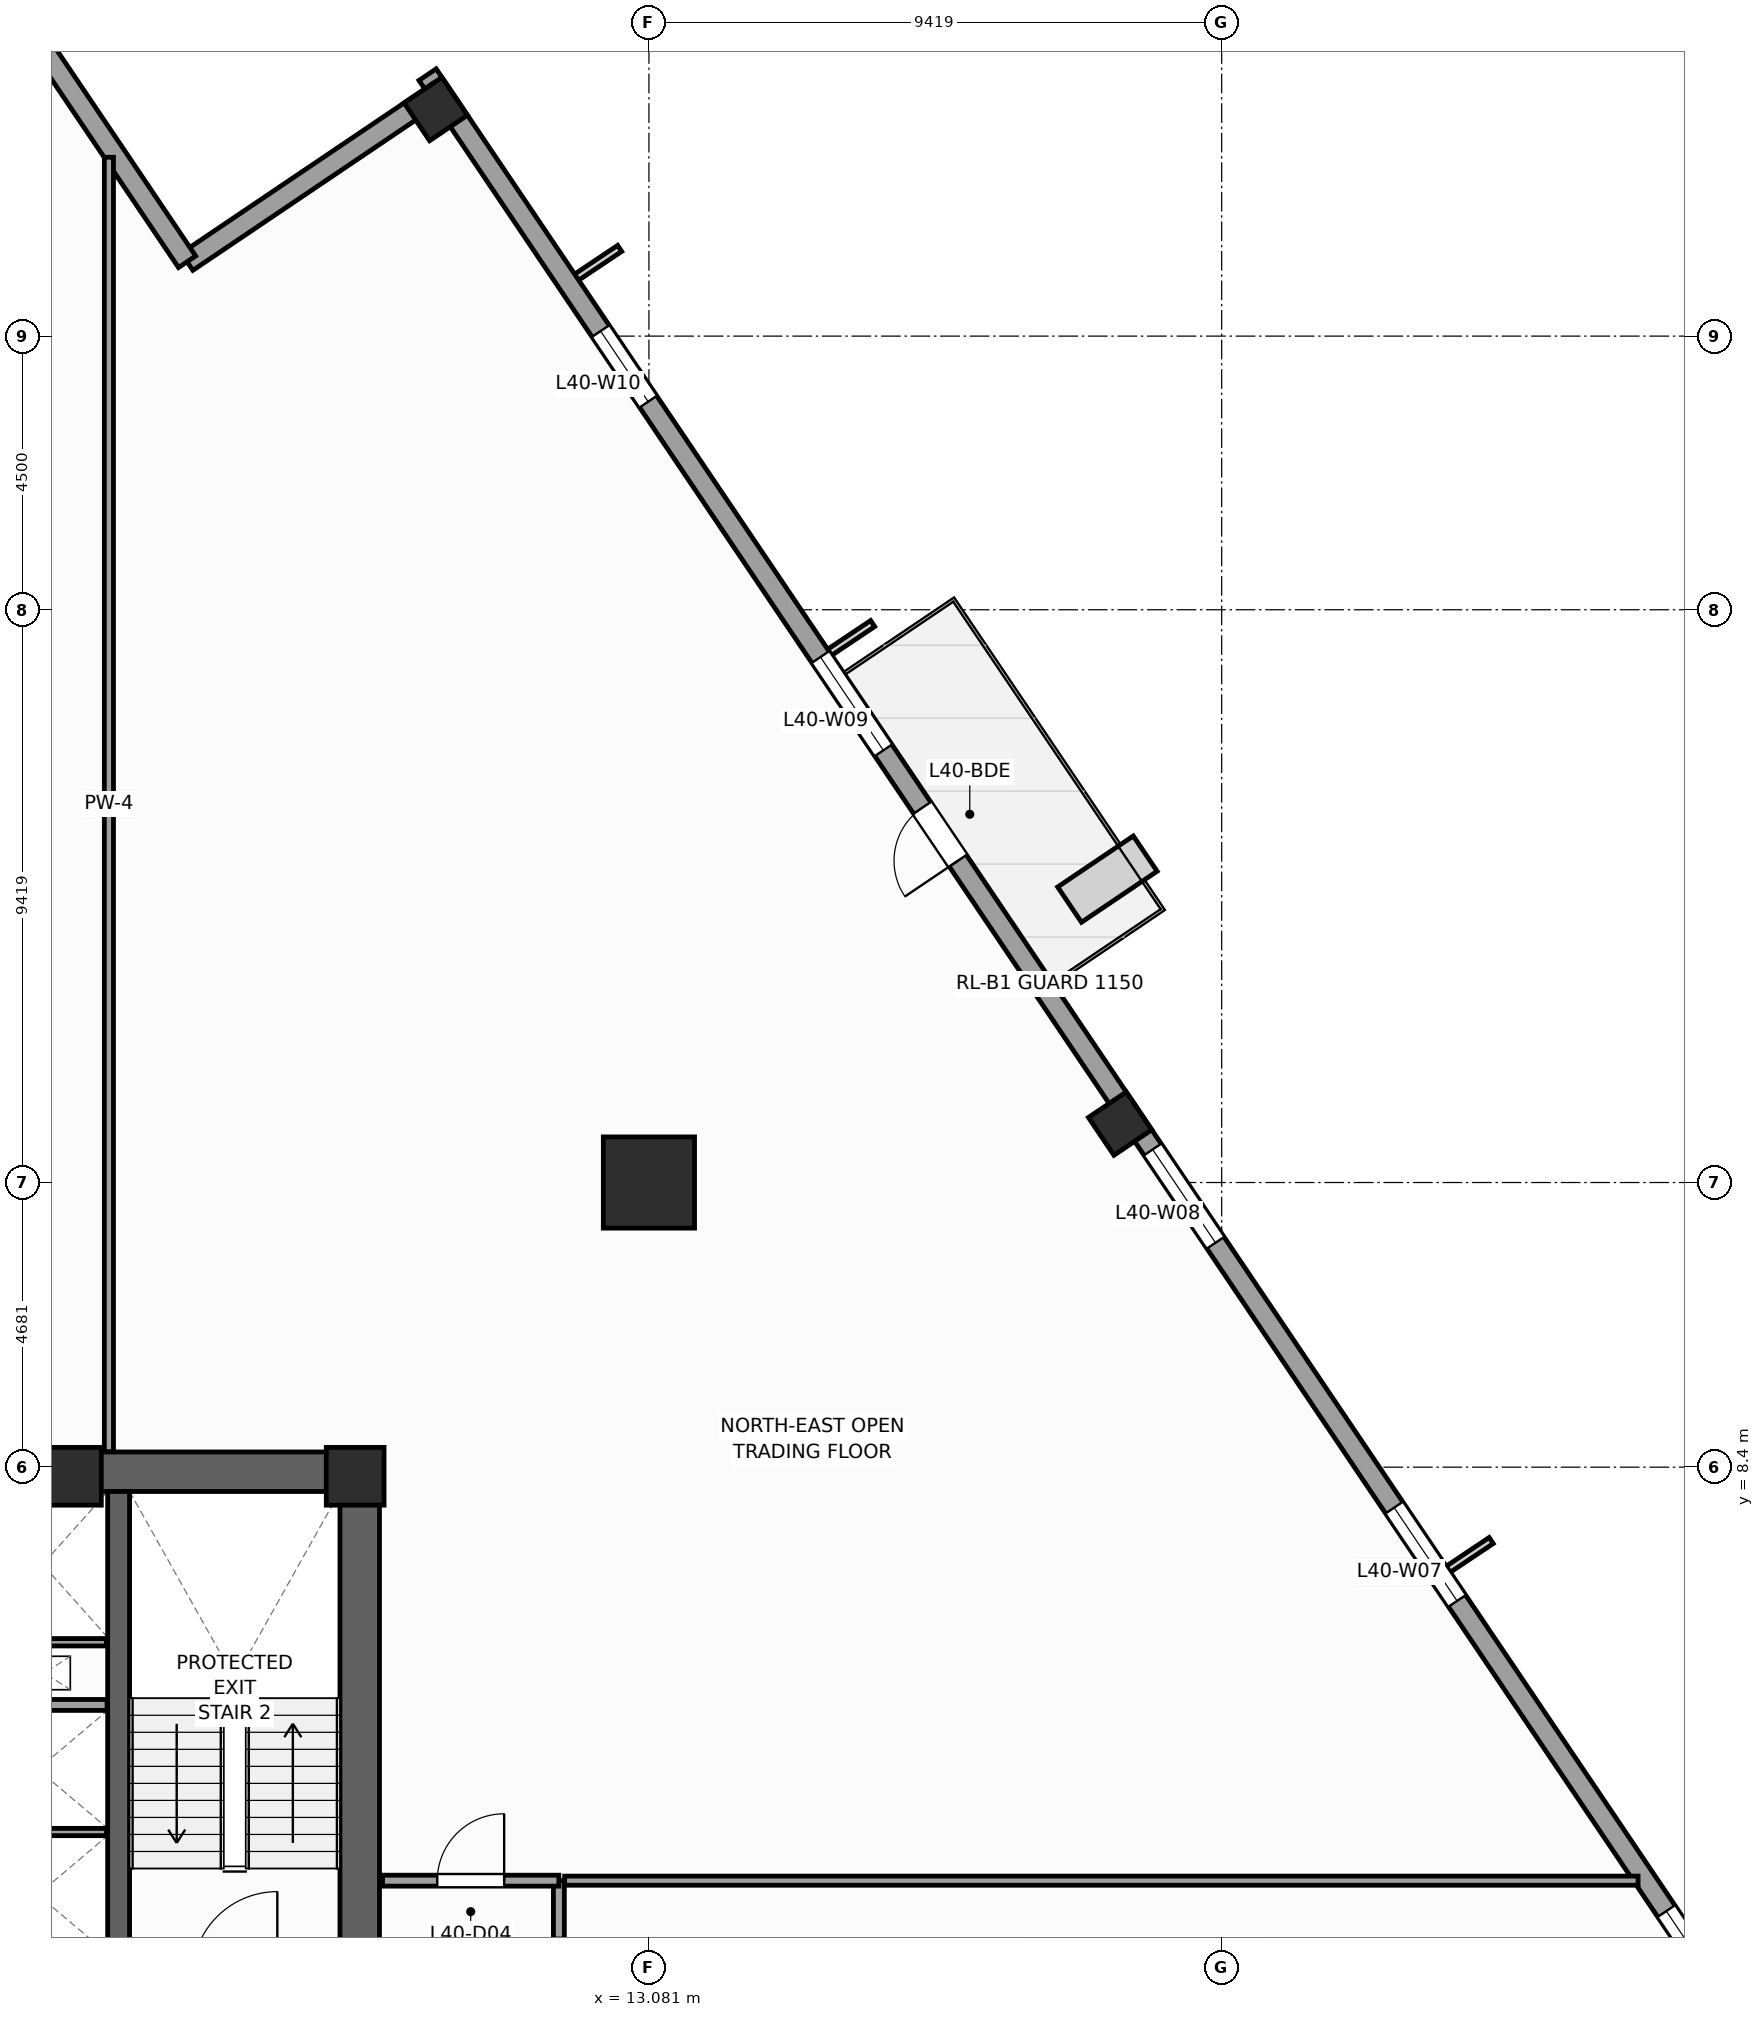
"""IFC4 building model, lengths in metres.
Left out: names, types, materials, properties, quantities, classifications, styles, units other than length and angle.
Written with IfcOpenShell. Run it as: python <this file> out.ifc"""

import sys

from ifc_helpers import new_model, si_unit, direction, frame, frame_2d, origin, origin_2d, place, context, subcontext, project, spatial, rectangle, extrude, source, transform, mapped, element, fill, save


model = new_model("IFC4")
c1 = context("Model", 3, precision=1e-05, world=origin(), true_north=direction((0.0, 1.0)))
c2 = subcontext(c1, "Body", "Model", "MODEL_VIEW")
j1 = project(units=[si_unit("LENGTHUNIT", "METRE"), si_unit("PLANEANGLEUNIT", "RADIAN")], contexts=[c1])
p1 = place(None, origin())
s1 = spatial("IfcSite", under=j1, at=p1, CompositionType="ELEMENT")
p2 = place(p1, origin())
s2 = spatial("IfcBuilding", under=s1, at=p2, CompositionType="ELEMENT")
p3 = place(p2, frame((0.0, 0.0, 168.4)))
s3 = spatial("IfcBuildingStorey", under=s2, at=p3, CompositionType="ELEMENT", Elevation=168.4)
p4 = place(p3, frame((-8.65, 8.325, 0.0), z_axis=(0.0, 0.0, 1.0), x_axis=(1.0, 0.0, 0.0)))
e1 = element("IfcWall", 1, at=p4, inside=s3, PredefinedType="SHEAR", context=c2, shape_type="SweptSolid", body=[
    extrude(rectangle(XDim=17.3, YDim=0.65, at=frame_2d((8.65, 0.0))), origin(), (0.0, 0.0, 1.0), 4.0),
])
p5 = place(p3, frame((8.325, -8.0, 0.0), z_axis=(0.0, 0.0, 1.0), x_axis=(0.0, 1.0, 0.0)))
e2 = element("IfcWall", 2, at=p5, inside=s3, PredefinedType="SHEAR", context=c2, shape_type="SweptSolid", body=[
    extrude(rectangle(XDim=16.0, YDim=0.65, at=frame_2d((8.0, 0.0))), origin(), (0.0, 0.0, 1.0), 4.0),
])
p6 = place(p5, frame((4.69, 0.0, 0.0)))
e3 = element("IfcOpeningElement", 3, at=p6, cuts=e2, PredefinedType="OPENING", context=c2, shape_type="SweptSolid", body=[
    extrude(rectangle(XDim=1.3, YDim=2.2, at=frame_2d((0.65, 1.1))), frame((0.0, 0.335, 0.0), z_axis=(0.0, -1.0, 0.0), x_axis=(1.0, 0.0, 0.0)), (0.0, 0.0, 1.0), 0.67),
])
p7 = place(p3, frame((4.36, -8.0, 0.0), z_axis=(0.0, 0.0, 1.0), x_axis=(0.0, 1.0, 0.0)))
e4 = element("IfcWall", 4, at=p7, inside=s3, PredefinedType="SHEAR", context=c2, shape_type="SweptSolid", body=[
    extrude(rectangle(XDim=16.0, YDim=0.36, at=frame_2d((8.0, 0.0))), origin(), (0.0, 0.0, 1.0), 4.0),
])
m1 = source(origin(), c2, "Body", "SweptSolid", [
    extrude(rectangle(XDim=0.95, YDim=0.95, at=origin_2d()), origin(), (0.0, 0.0, 1.0), 4.0),
])
for number, where, z_axis, x_axis in (
    (5, (8.25, 8.25, 0.0), (0.0, 0.0, 1.0), (1.0, 0.0, 0.0)),
    (6, (3.6, 8.25, 0.0), (0.0, 0.0, 1.0), (1.0, 0.0, 0.0)),
):
    element("IfcColumn", number, at=place(p3, frame(where, z_axis=z_axis, x_axis=x_axis)), inside=s3, PredefinedType="PILASTER", context=c2, shape_type="MappedRepresentation", body=[
        mapped(m1, transform((0.0, 0.0, 0.0), scale=1.0)),
    ])
m2 = source(origin(), c2, "Body", "SweptSolid", [
    extrude(rectangle(XDim=1.5, YDim=1.5, at=origin_2d()), origin(), (0.0, 0.0, 1.0), 4.0),
])
p8 = place(p3, frame((13.081, 13.081, 0.0), z_axis=(0.0, 0.0, 1.0), x_axis=(1.0, 0.0, 0.0)))
e7 = element("IfcColumn", 7, at=p8, inside=s3, PredefinedType="COLUMN", context=c2, shape_type="MappedRepresentation", body=[
    mapped(m2, transform((0.0, 0.0, 0.0), scale=1.0)),
])
m3 = source(origin(), c2, "Body", "SweptSolid", [
    extrude(rectangle(XDim=0.75, YDim=0.75, at=origin_2d()), origin(), (0.0, 0.0, 1.0), 4.0),
])
for number, where, z_axis, x_axis in (
    (8, (20.83, 14.05, 0.0), (0.0, 0.0, 1.0), (0.829, 0.559, 0.0)),
    (9, (9.576, 30.734, 0.0), (0.0, 0.0, 1.0), (0.829, 0.559, 0.0)),
):
    element("IfcColumn", number, at=place(p3, frame(where, z_axis=z_axis, x_axis=x_axis)), inside=s3, PredefinedType="COLUMN", context=c2, shape_type="MappedRepresentation", body=[
        mapped(m3, transform((0.0, 0.0, 0.0), scale=1.0)),
    ])
p9 = place(p3, frame((32.558, -2.972, 0.0), z_axis=(0.0, 0.0, 1.0), x_axis=(-0.559194910251, 0.829036218961, 0.0)))
e10 = element("IfcWall", 10, at=p9, inside=s3, PredefinedType="STANDARD", context=c2, shape_type="SweptSolid", body=[
    extrude(rectangle(XDim=41.34, YDim=0.34, at=frame_2d((20.67, 0.0))), origin(), (0.0, 0.0, 1.0), 3.04),
])
p10 = place(p9, frame((25.745, 0.0, 0.0)))
e11 = element("IfcOpeningElement", 11, at=p10, cuts=e10, PredefinedType="OPENING", context=c2, shape_type="SweptSolid", body=[
    extrude(rectangle(XDim=1.05, YDim=2.25, at=frame_2d((0.525, 1.125))), frame((0.0, 0.18, 0.0), z_axis=(0.0, -1.0, 0.0), x_axis=(1.0, 0.0, 0.0)), (0.0, 0.0, 1.0), 0.36),
])
p11 = place(p9, frame((3.511, 0.0, 0.56)))
e12 = element("IfcOpeningElement", 12, at=p11, cuts=e10, PredefinedType="OPENING", context=c2, shape_type="SweptSolid", body=[
    extrude(rectangle(XDim=1.4, YDim=2.4, at=frame_2d((0.7, 1.2))), frame((0.0, 0.18, 0.0), z_axis=(0.0, -1.0, 0.0), x_axis=(1.0, 0.0, 0.0)), (0.0, 0.0, 1.0), 0.36),
])
p12 = place(p9, frame((11.064, 0.0, 0.61)))
e13 = element("IfcOpeningElement", 13, at=p12, cuts=e10, PredefinedType="OPENING", context=c2, shape_type="SweptSolid", body=[
    extrude(rectangle(XDim=1.85, YDim=2.35, at=frame_2d((0.925, 1.175))), frame((0.0, 0.18, 0.0), z_axis=(0.0, -1.0, 0.0), x_axis=(1.0, 0.0, 0.0)), (0.0, 0.0, 1.0), 0.36),
])
p13 = place(p9, frame((18.168, 0.0, 0.61)))
e14 = element("IfcOpeningElement", 14, at=p13, cuts=e10, PredefinedType="OPENING", context=c2, shape_type="SweptSolid", body=[
    extrude(rectangle(XDim=1.85, YDim=2.35, at=frame_2d((0.925, 1.175))), frame((0.0, 0.18, 0.0), z_axis=(0.0, -1.0, 0.0), x_axis=(1.0, 0.0, 0.0)), (0.0, 0.0, 1.0), 0.36),
])
p14 = place(p9, frame((27.936, 0.0, 0.61)))
e15 = element("IfcOpeningElement", 15, at=p14, cuts=e10, PredefinedType="OPENING", context=c2, shape_type="SweptSolid", body=[
    extrude(rectangle(XDim=1.85, YDim=2.35, at=frame_2d((0.925, 1.175))), frame((0.0, 0.18, 0.0), z_axis=(0.0, -1.0, 0.0), x_axis=(1.0, 0.0, 0.0)), (0.0, 0.0, 1.0), 0.36),
])
p15 = place(p9, frame((34.852, 0.0, 0.56)))
e16 = element("IfcOpeningElement", 16, at=p15, cuts=e10, PredefinedType="OPENING", context=c2, shape_type="SweptSolid", body=[
    extrude(rectangle(XDim=1.4, YDim=2.4, at=frame_2d((0.7, 1.2))), frame((0.0, 0.18, 0.0), z_axis=(0.0, -1.0, 0.0), x_axis=(1.0, 0.0, 0.0)), (0.0, 0.0, 1.0), 0.36),
])
p16 = place(p3, frame((9.631, 31.019, 0.0), z_axis=(0.0, 0.0, 1.0), x_axis=(-0.829025804298, -0.559210350234, 0.0)))
e17 = element("IfcWall", 17, at=p16, inside=s3, PredefinedType="STANDARD", context=c2, shape_type="SweptSolid", body=[
    extrude(rectangle(XDim=5.0, YDim=0.34, at=frame_2d((2.5, 0.0))), origin(), (0.0, 0.0, 1.0), 3.74),
])
p17 = place(p3, frame((5.486, 28.223, 0.0), z_axis=(0.0, 0.0, 1.0), x_axis=(-0.559171107879, 0.82905227345, 0.0)))
e18 = element("IfcWall", 18, at=p17, inside=s3, PredefinedType="STANDARD", context=c2, shape_type="SweptSolid", body=[
    extrude(rectangle(XDim=5.17, YDim=0.34, at=frame_2d((2.585, 0.0))), origin(), (0.0, 0.0, 1.0), 3.04),
])
p18 = place(p3, frame((1.89, 4.49, 0.0), z_axis=(0.0, 0.0, 1.0), x_axis=(1.0, 0.0, 0.0)))
e19 = element("IfcWall", 19, at=p18, inside=s3, PredefinedType="PARTITIONING", context=c2, shape_type="SweptSolid", body=[
    extrude(rectangle(XDim=2.28, YDim=0.18, at=frame_2d((1.14, 0.0))), origin(), (0.0, 0.0, 1.0), 3.74),
])
p19 = place(p3, frame((1.9, 2.4, 0.0), z_axis=(0.0, 0.0, 1.0), x_axis=(1.0, 0.0, 0.0)))
e20 = element("IfcWall", 20, at=p19, inside=s3, PredefinedType="PARTITIONING", context=c2, shape_type="SweptSolid", body=[
    extrude(rectangle(XDim=2.26, YDim=0.12, at=frame_2d((1.13, 0.0))), origin(), (0.0, 0.0, 1.0), 3.74),
])
p20 = place(p3, frame((2.06, 5.52, 0.0), z_axis=(0.0, 0.0, 1.0), x_axis=(1.0, 0.0, 0.0)))
e21 = element("IfcWall", 21, at=p20, inside=s3, PredefinedType="PARTITIONING", context=c2, shape_type="SweptSolid", body=[
    extrude(rectangle(XDim=2.1, YDim=0.12, at=frame_2d((1.05, 0.0))), origin(), (0.0, 0.0, 1.0), 3.74),
])
p21 = place(p3, frame((11.6, -10.35, 0.0), z_axis=(0.0, 0.0, 1.0), x_axis=(0.0, 1.0, 0.0)))
e22 = element("IfcWall", 22, at=p21, inside=s3, PredefinedType="PARTITIONING", context=c2, shape_type="SweptSolid", body=[
    extrude(rectangle(XDim=11.95, YDim=0.18, at=frame_2d((5.975, 0.0))), origin(), (0.0, 0.0, 1.0), 3.74),
])
p22 = place(p21, frame((9.911, 0.0, 0.0)))
e23 = element("IfcOpeningElement", 23, at=p22, cuts=e22, PredefinedType="OPENING", context=c2, shape_type="SweptSolid", body=[
    extrude(rectangle(XDim=1.1, YDim=2.2, at=frame_2d((0.55, 1.1))), frame((0.0, 0.1, 0.0), z_axis=(0.0, -1.0, 0.0), x_axis=(1.0, 0.0, 0.0)), (0.0, 0.0, 1.0), 0.2),
])
p23 = place(p21, frame((4.1, 0.0, 0.0)))
e24 = element("IfcOpeningElement", 24, at=p23, cuts=e22, PredefinedType="OPENING", context=c2, shape_type="SweptSolid", body=[
    extrude(rectangle(XDim=1.1, YDim=2.2, at=frame_2d((0.55, 1.1))), frame((0.0, 0.1, 0.0), z_axis=(0.0, -1.0, 0.0), x_axis=(1.0, 0.0, 0.0)), (0.0, 0.0, 1.0), 0.2),
])
p24 = place(p21, frame((7.675, 0.0, 0.0)))
e25 = element("IfcOpeningElement", 25, at=p24, cuts=e22, PredefinedType="OPENING", context=c2, shape_type="SweptSolid", body=[
    extrude(rectangle(XDim=1.1, YDim=2.2, at=frame_2d((0.55, 1.1))), frame((0.0, 0.1, 0.0), z_axis=(0.0, -1.0, 0.0), x_axis=(1.0, 0.0, 0.0)), (0.0, 0.0, 1.0), 0.2),
])
p25 = place(p3, frame((8.7, 1.6, 0.0), z_axis=(0.0, 0.0, 1.0), x_axis=(1.0, 0.0, 0.0)))
e26 = element("IfcWall", 26, at=p25, inside=s3, PredefinedType="PARTITIONING", context=c2, shape_type="SweptSolid", body=[
    extrude(rectangle(XDim=2.9, YDim=0.18, at=frame_2d((1.45, 0.0))), origin(), (0.0, 0.0, 1.0), 3.74),
])
p26 = place(p25, frame((0.9, 0.0, 0.0)))
e27 = element("IfcOpeningElement", 27, at=p26, cuts=e26, PredefinedType="OPENING", context=c2, shape_type="SweptSolid", body=[
    extrude(rectangle(XDim=1.1, YDim=2.2, at=frame_2d((0.55, 1.1))), frame((0.0, 0.1, 0.0), z_axis=(0.0, -1.0, 0.0), x_axis=(1.0, 0.0, 0.0)), (0.0, 0.0, 1.0), 0.2),
])
p27 = place(p3, frame((4.2, 8.655, 0.0), z_axis=(0.0, 0.0, 1.0), x_axis=(0.0, 1.0, 0.0)))
e28 = element("IfcWall", 28, at=p27, inside=s3, PredefinedType="PARTITIONING", context=c2, shape_type="SweptSolid", body=[
    extrude(rectangle(XDim=21.286, YDim=0.15, at=frame_2d((10.643, 0.0))), origin(), (0.0, 0.0, 1.0), 3.74),
])
p28 = place(p3, frame((11.695, 1.6, 0.0), z_axis=(0.0, 0.0, 1.0), x_axis=(1.0, 0.0, 0.0)))
e29 = element("IfcWall", 29, at=p28, inside=s3, PredefinedType="PARTITIONING", context=c2, shape_type="SweptSolid", body=[
    extrude(rectangle(XDim=17.653, YDim=0.15, at=frame_2d((8.826, 0.0))), origin(), (0.0, 0.0, 1.0), 3.74),
])
m4 = source(origin(), c2, "Body", "SweptSolid", [
    extrude(rectangle(XDim=1.05, YDim=2.25, at=frame_2d((0.525, 1.125))), frame((0.0, 0.025, 0.0), z_axis=(0.0, -1.0, 0.0), x_axis=(1.0, 0.0, 0.0)), (0.0, 0.0, 1.0), 0.05),
])
p29 = place(p10, origin())
e30 = element("IfcDoor", 30, at=p29, inside=s3, OperationType="SINGLE_SWING_LEFT", PredefinedType="DOOR", context=c2, shape_type="MappedRepresentation", body=[
    mapped(m4, transform((0.0, 0.0, 0.0), scale=1.0)),
])
fill(e11, e30)
m5 = source(origin(), c2, "Body", "SweptSolid", [
    extrude(rectangle(XDim=1.4, YDim=2.4, at=frame_2d((0.7, 1.2))), frame((0.0, 0.03, 0.0), z_axis=(0.0, -1.0, 0.0), x_axis=(1.0, 0.0, 0.0)), (0.0, 0.0, 1.0), 0.06),
])
p30 = place(p11, origin())
e31 = element("IfcWindow", 31, at=p30, inside=s3, PartitioningType="SINGLE_PANEL", PredefinedType="WINDOW", context=c2, shape_type="MappedRepresentation", body=[
    mapped(m5, transform((0.0, 0.0, 0.0), scale=1.0)),
])
fill(e12, e31)
m6 = source(origin(), c2, "Body", "SweptSolid", [
    extrude(rectangle(XDim=1.85, YDim=2.35, at=frame_2d((0.925, 1.175))), frame((0.0, 0.03, 0.0), z_axis=(0.0, -1.0, 0.0), x_axis=(1.0, 0.0, 0.0)), (0.0, 0.0, 1.0), 0.06),
])
p31 = place(p12, origin())
e32 = element("IfcWindow", 32, at=p31, inside=s3, PartitioningType="SINGLE_PANEL", PredefinedType="WINDOW", context=c2, shape_type="MappedRepresentation", body=[
    mapped(m6, transform((0.0, 0.0, 0.0), scale=1.0)),
])
fill(e13, e32)
p32 = place(p13, origin())
e33 = element("IfcWindow", 33, at=p32, inside=s3, PartitioningType="SINGLE_PANEL", PredefinedType="WINDOW", context=c2, shape_type="MappedRepresentation", body=[
    mapped(m6, transform((0.0, 0.0, 0.0), scale=1.0)),
])
fill(e14, e33)
p33 = place(p14, origin())
e34 = element("IfcWindow", 34, at=p33, inside=s3, PartitioningType="SINGLE_PANEL", PredefinedType="WINDOW", context=c2, shape_type="MappedRepresentation", body=[
    mapped(m6, transform((0.0, 0.0, 0.0), scale=1.0)),
])
fill(e15, e34)
p34 = place(p15, origin())
e35 = element("IfcWindow", 35, at=p34, inside=s3, PartitioningType="SINGLE_PANEL", PredefinedType="WINDOW", context=c2, shape_type="MappedRepresentation", body=[
    mapped(m5, transform((0.0, 0.0, 0.0), scale=1.0)),
])
fill(e16, e35)
m7 = source(origin(), c2, "Body", "SweptSolid", [
    extrude(rectangle(XDim=1.1, YDim=2.2, at=frame_2d((0.55, 1.1))), frame((0.0, 0.025, 0.0), z_axis=(0.0, -1.0, 0.0), x_axis=(1.0, 0.0, 0.0)), (0.0, 0.0, 1.0), 0.05),
])
p35 = place(p26, origin())
e36 = element("IfcDoor", 36, at=p35, inside=s3, OperationType="SINGLE_SWING_RIGHT", PredefinedType="DOOR", context=c2, shape_type="MappedRepresentation", body=[
    mapped(m7, transform((0.0, 0.0, 0.0), scale=1.0)),
])
fill(e27, e36)
save(model, sys.argv[1])
